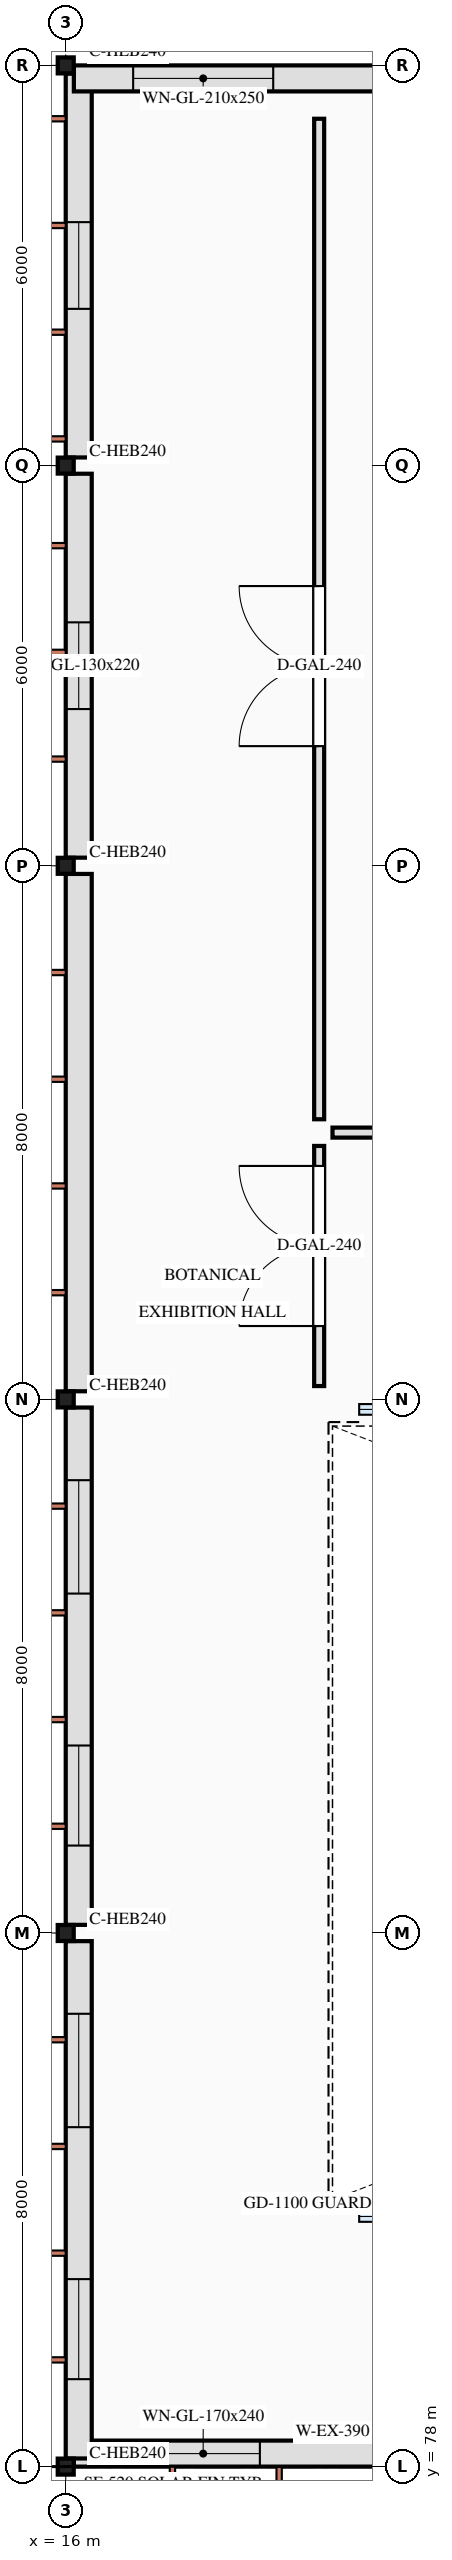
"""IFC4 building model, lengths in metres.
Left out: names, types, materials, properties, quantities, classifications, styles, units other than length and angle.
Written with IfcOpenShell. Run it as: python <this file> out.ifc"""

import sys

from ifc_helpers import new_model, si_unit, direction, frame, frame_2d, origin, origin_2d, place, context, subcontext, project, spatial, rectangle, i_section, extrude, element, fill, save


model = new_model("IFC4")
c1 = context("Model", 3, precision=1e-05, world=origin(), true_north=direction((0.0, 1.0)))
c2 = subcontext(c1, "Body", "Model", "MODEL_VIEW")
j1 = project(units=[si_unit("LENGTHUNIT", "METRE"), si_unit("PLANEANGLEUNIT", "RADIAN")], contexts=[c1])
p1 = place(None, origin())
s1 = spatial("IfcSite", under=j1, at=p1, CompositionType="ELEMENT")
p2 = place(p1, origin())
s2 = spatial("IfcBuilding", under=s1, at=p2, CompositionType="ELEMENT")
p3 = place(p2, frame((0.0, 0.0, 17.6)))
s3 = spatial("IfcBuildingStorey", under=s2, at=p3, CompositionType="ELEMENT", Elevation=17.6)
for number, where, z_axis, x_axis in (
    (1, (16.0, 78.0, 0.0), (0.0, 0.0, 1.0), (1.0, 0.0, 0.0)),
    (2, (16.0, 86.0, 0.0), (0.0, 0.0, 1.0), (1.0, 0.0, 0.0)),
    (3, (16.0, 94.0, 0.0), (0.0, 0.0, 1.0), (1.0, 0.0, 0.0)),
    (4, (16.0, 102.0, 0.0), (0.0, 0.0, 1.0), (1.0, 0.0, 0.0)),
    (5, (16.0, 108.0, 0.0), (0.0, 0.0, 1.0), (1.0, 0.0, 0.0)),
    (6, (16.0, 114.0, 0.0), (0.0, 0.0, 1.0), (1.0, 0.0, 0.0)),
):
    element("IfcColumn", number, at=place(p3, frame(where, z_axis=z_axis, x_axis=x_axis)), inside=s3, PredefinedType="COLUMN", context=c2, shape_type="SweptSolid", body=[
        extrude(i_section(OverallWidth=0.24, OverallDepth=0.24, WebThickness=0.01, FlangeThickness=0.017, FilletRadius=0.021, at=origin_2d()), origin(), (0.0, 0.0, 1.0), 4.2),
    ])
p4 = place(p3, frame((23.878, 78.195, 0.0), z_axis=(0.0, 0.0, 1.0), x_axis=(-1.0, 0.0, 0.0)))
e7 = element("IfcWall", 7, at=p4, inside=s3, PredefinedType="SOLIDWALL", context=c2, shape_type="SweptSolid", body=[
    extrude(rectangle(XDim=7.756, YDim=0.39, at=frame_2d((3.878, 0.0))), origin(), (0.0, 0.0, 1.0), 3.505),
])
p5 = place(p4, frame((1.189, 0.0, 0.85)))
e8 = element("IfcOpeningElement", 8, at=p5, cuts=e7, PredefinedType="OPENING", context=c2, shape_type="SweptSolid", body=[
    extrude(rectangle(XDim=1.5, YDim=2.4, at=frame_2d((0.75, 1.2))), frame((0.0, 0.205, 0.0), z_axis=(0.0, -1.0, 0.0), x_axis=(1.0, 0.0, 0.0)), (0.0, 0.0, 1.0), 0.41),
])
p6 = place(p4, frame((4.967, 0.0, 0.85)))
e9 = element("IfcOpeningElement", 9, at=p6, cuts=e7, PredefinedType="OPENING", context=c2, shape_type="SweptSolid", body=[
    extrude(rectangle(XDim=1.7, YDim=2.4, at=frame_2d((0.85, 1.2))), frame((0.0, 0.205, 0.0), z_axis=(0.0, -1.0, 0.0), x_axis=(1.0, 0.0, 0.0)), (0.0, 0.0, 1.0), 0.41),
])
p7 = place(p3, frame((16.195, 78.122, 0.0), z_axis=(0.0, 0.0, 1.0), x_axis=(0.0, 1.0, 0.0)))
e10 = element("IfcWall", 10, at=p7, inside=s3, PredefinedType="SOLIDWALL", context=c2, shape_type="SweptSolid", body=[
    extrude(rectangle(XDim=7.756, YDim=0.39, at=frame_2d((3.878, 0.0))), origin(), (0.0, 0.0, 1.0), 3.505),
])
p8 = place(p7, frame((1.189, 0.0, 0.85)))
e11 = element("IfcOpeningElement", 11, at=p8, cuts=e10, PredefinedType="OPENING", context=c2, shape_type="SweptSolid", body=[
    extrude(rectangle(XDim=1.5, YDim=2.4, at=frame_2d((0.75, 1.2))), frame((0.0, 0.205, 0.0), z_axis=(0.0, -1.0, 0.0), x_axis=(1.0, 0.0, 0.0)), (0.0, 0.0, 1.0), 0.41),
])
p9 = place(p7, frame((4.967, 0.0, 0.85)))
e12 = element("IfcOpeningElement", 12, at=p9, cuts=e10, PredefinedType="OPENING", context=c2, shape_type="SweptSolid", body=[
    extrude(rectangle(XDim=1.7, YDim=2.4, at=frame_2d((0.85, 1.2))), frame((0.0, 0.205, 0.0), z_axis=(0.0, -1.0, 0.0), x_axis=(1.0, 0.0, 0.0)), (0.0, 0.0, 1.0), 0.41),
])
p10 = place(p3, frame((16.195, 86.122, 0.0), z_axis=(0.0, 0.0, 1.0), x_axis=(0.0, 1.0, 0.0)))
e13 = element("IfcWall", 13, at=p10, inside=s3, PredefinedType="SOLIDWALL", context=c2, shape_type="SweptSolid", body=[
    extrude(rectangle(XDim=7.756, YDim=0.39, at=frame_2d((3.878, 0.0))), origin(), (0.0, 0.0, 1.0), 3.505),
])
p11 = place(p10, frame((1.189, 0.0, 0.85)))
e14 = element("IfcOpeningElement", 14, at=p11, cuts=e13, PredefinedType="OPENING", context=c2, shape_type="SweptSolid", body=[
    extrude(rectangle(XDim=1.5, YDim=2.4, at=frame_2d((0.75, 1.2))), frame((0.0, 0.205, 0.0), z_axis=(0.0, -1.0, 0.0), x_axis=(1.0, 0.0, 0.0)), (0.0, 0.0, 1.0), 0.41),
])
p12 = place(p10, frame((4.967, 0.0, 0.85)))
e15 = element("IfcOpeningElement", 15, at=p12, cuts=e13, PredefinedType="OPENING", context=c2, shape_type="SweptSolid", body=[
    extrude(rectangle(XDim=1.7, YDim=2.4, at=frame_2d((0.85, 1.2))), frame((0.0, 0.205, 0.0), z_axis=(0.0, -1.0, 0.0), x_axis=(1.0, 0.0, 0.0)), (0.0, 0.0, 1.0), 0.41),
])
p13 = place(p3, frame((16.195, 94.122, 0.0), z_axis=(0.0, 0.0, 1.0), x_axis=(0.0, 1.0, 0.0)))
e16 = element("IfcWall", 16, at=p13, inside=s3, PredefinedType="SOLIDWALL", context=c2, shape_type="SweptSolid", body=[
    extrude(rectangle(XDim=7.756, YDim=0.39, at=frame_2d((3.878, 0.0))), origin(), (0.0, 0.0, 1.0), 3.505),
])
p14 = place(p3, frame((16.195, 102.122, 0.0), z_axis=(0.0, 0.0, 1.0), x_axis=(0.0, 1.0, 0.0)))
e17 = element("IfcWall", 17, at=p14, inside=s3, PredefinedType="SOLIDWALL", context=c2, shape_type="SweptSolid", body=[
    extrude(rectangle(XDim=5.756, YDim=0.39, at=frame_2d((2.878, 0.0))), origin(), (0.0, 0.0, 1.0), 3.505),
])
p15 = place(p14, frame((2.228, 0.0, 0.85)))
e18 = element("IfcOpeningElement", 18, at=p15, cuts=e17, PredefinedType="OPENING", context=c2, shape_type="SweptSolid", body=[
    extrude(rectangle(XDim=1.3, YDim=2.2, at=frame_2d((0.65, 1.1))), frame((0.0, 0.205, 0.0), z_axis=(0.0, -1.0, 0.0), x_axis=(1.0, 0.0, 0.0)), (0.0, 0.0, 1.0), 0.41),
])
p16 = place(p3, frame((16.195, 108.122, 0.0), z_axis=(0.0, 0.0, 1.0), x_axis=(0.0, 1.0, 0.0)))
e19 = element("IfcWall", 19, at=p16, inside=s3, PredefinedType="SOLIDWALL", context=c2, shape_type="SweptSolid", body=[
    extrude(rectangle(XDim=5.756, YDim=0.39, at=frame_2d((2.878, 0.0))), origin(), (0.0, 0.0, 1.0), 3.505),
])
p17 = place(p16, frame((2.228, 0.0, 0.85)))
e20 = element("IfcOpeningElement", 20, at=p17, cuts=e19, PredefinedType="OPENING", context=c2, shape_type="SweptSolid", body=[
    extrude(rectangle(XDim=1.3, YDim=2.2, at=frame_2d((0.65, 1.1))), frame((0.0, 0.205, 0.0), z_axis=(0.0, -1.0, 0.0), x_axis=(1.0, 0.0, 0.0)), (0.0, 0.0, 1.0), 0.41),
])
p18 = place(p3, frame((16.122, 113.805, 0.0), z_axis=(0.0, 0.0, 1.0), x_axis=(1.0, 0.0, 0.0)))
e21 = element("IfcWall", 21, at=p18, inside=s3, PredefinedType="SOLIDWALL", context=c2, shape_type="SweptSolid", body=[
    extrude(rectangle(XDim=7.756, YDim=0.39, at=frame_2d((3.878, 0.0))), origin(), (0.0, 0.0, 1.0), 3.505),
])
p19 = place(p18, frame((0.889, 0.0, 0.85)))
e22 = element("IfcOpeningElement", 22, at=p19, cuts=e21, PredefinedType="OPENING", context=c2, shape_type="SweptSolid", body=[
    extrude(rectangle(XDim=2.1, YDim=2.5, at=frame_2d((1.05, 1.25))), frame((0.0, 0.205, 0.0), z_axis=(0.0, -1.0, 0.0), x_axis=(1.0, 0.0, 0.0)), (0.0, 0.0, 1.0), 0.41),
])
p20 = place(p18, frame((4.617, 0.0, 0.765)))
e23 = element("IfcOpeningElement", 23, at=p20, cuts=e21, PredefinedType="OPENING", context=c2, shape_type="SweptSolid", body=[
    extrude(rectangle(XDim=2.4, YDim=2.6, at=frame_2d((1.2, 1.3))), frame((0.0, 0.205, 0.0), z_axis=(0.0, -1.0, 0.0), x_axis=(1.0, 0.0, 0.0)), (0.0, 0.0, 1.0), 0.41),
])
p21 = place(p3, frame((19.8, 94.2, 0.0), z_axis=(0.0, 0.0, 1.0), x_axis=(0.0, 1.0, 0.0)))
e24 = element("IfcWall", 24, at=p21, inside=s3, PredefinedType="PARTITIONING", context=c2, shape_type="SweptSolid", body=[
    extrude(rectangle(XDim=3.6, YDim=0.15, at=frame_2d((1.8, 0.0))), origin(), (0.0, 0.0, 1.0), 3.96),
])
p22 = place(p21, frame((0.9, 0.0, 0.0)))
e25 = element("IfcOpeningElement", 25, at=p22, cuts=e24, PredefinedType="OPENING", context=c2, shape_type="SweptSolid", body=[
    extrude(rectangle(XDim=2.4, YDim=2.75, at=frame_2d((1.2, 1.375))), frame((0.0, 0.085, 0.0), z_axis=(0.0, -1.0, 0.0), x_axis=(1.0, 0.0, 0.0)), (0.0, 0.0, 1.0), 0.17),
])
p23 = place(p3, frame((20.0, 98.0, 0.0), z_axis=(0.0, 0.0, 1.0), x_axis=(1.0, 0.0, 0.0)))
e26 = element("IfcWall", 26, at=p23, inside=s3, PredefinedType="PARTITIONING", context=c2, shape_type="SweptSolid", body=[
    extrude(rectangle(XDim=20.8, YDim=0.15, at=frame_2d((10.4, 0.0))), origin(), (0.0, 0.0, 1.0), 3.96),
])
p24 = place(p23, frame((7.043, 0.0, 0.0)))
e27 = element("IfcOpeningElement", 27, at=p24, cuts=e26, PredefinedType="OPENING", context=c2, shape_type="SweptSolid", body=[
    extrude(rectangle(XDim=2.1, YDim=2.6, at=frame_2d((1.05, 1.3))), frame((0.0, 0.085, 0.0), z_axis=(0.0, -1.0, 0.0), x_axis=(1.0, 0.0, 0.0)), (0.0, 0.0, 1.0), 0.17),
])
p25 = place(p3, frame((19.8, 98.2, 0.0), z_axis=(0.0, 0.0, 1.0), x_axis=(0.0, 1.0, 0.0)))
e28 = element("IfcWall", 28, at=p25, inside=s3, PredefinedType="PARTITIONING", context=c2, shape_type="SweptSolid", body=[
    extrude(rectangle(XDim=15.0, YDim=0.15, at=frame_2d((7.5, 0.0))), origin(), (0.0, 0.0, 1.0), 3.96),
])
p26 = place(p25, frame((5.594, 0.0, 0.0)))
e29 = element("IfcOpeningElement", 29, at=p26, cuts=e28, PredefinedType="OPENING", context=c2, shape_type="SweptSolid", body=[
    extrude(rectangle(XDim=2.4, YDim=2.75, at=frame_2d((1.2, 1.375))), frame((0.0, 0.085, 0.0), z_axis=(0.0, -1.0, 0.0), x_axis=(1.0, 0.0, 0.0)), (0.0, 0.0, 1.0), 0.17),
])
p27 = place(p6, origin())
e30 = element("IfcWindow", 30, at=p27, inside=s3, PartitioningType="DOUBLE_PANEL_VERTICAL", PredefinedType="WINDOW", context=c2, shape_type="SweptSolid", body=[
    extrude(rectangle(XDim=1.7, YDim=2.4, at=frame_2d((0.85, 1.2))), frame((0.0, 0.03, 0.0), z_axis=(0.0, -1.0, 0.0), x_axis=(1.0, 0.0, 0.0)), (0.0, 0.0, 1.0), 0.06),
])
fill(e9, e30)
p28 = place(p8, origin())
e31 = element("IfcWindow", 31, at=p28, inside=s3, PartitioningType="SINGLE_PANEL", PredefinedType="WINDOW", context=c2, shape_type="SweptSolid", body=[
    extrude(rectangle(XDim=1.5, YDim=2.4, at=frame_2d((0.75, 1.2))), frame((0.0, 0.03, 0.0), z_axis=(0.0, -1.0, 0.0), x_axis=(1.0, 0.0, 0.0)), (0.0, 0.0, 1.0), 0.06),
])
fill(e11, e31)
p29 = place(p9, origin())
e32 = element("IfcWindow", 32, at=p29, inside=s3, PartitioningType="DOUBLE_PANEL_VERTICAL", PredefinedType="WINDOW", context=c2, shape_type="SweptSolid", body=[
    extrude(rectangle(XDim=1.7, YDim=2.4, at=frame_2d((0.85, 1.2))), frame((0.0, 0.03, 0.0), z_axis=(0.0, -1.0, 0.0), x_axis=(1.0, 0.0, 0.0)), (0.0, 0.0, 1.0), 0.06),
])
fill(e12, e32)
p30 = place(p11, origin())
e33 = element("IfcWindow", 33, at=p30, inside=s3, PartitioningType="SINGLE_PANEL", PredefinedType="WINDOW", context=c2, shape_type="SweptSolid", body=[
    extrude(rectangle(XDim=1.5, YDim=2.4, at=frame_2d((0.75, 1.2))), frame((0.0, 0.03, 0.0), z_axis=(0.0, -1.0, 0.0), x_axis=(1.0, 0.0, 0.0)), (0.0, 0.0, 1.0), 0.06),
])
fill(e14, e33)
p31 = place(p12, origin())
e34 = element("IfcWindow", 34, at=p31, inside=s3, PartitioningType="DOUBLE_PANEL_VERTICAL", PredefinedType="WINDOW", context=c2, shape_type="SweptSolid", body=[
    extrude(rectangle(XDim=1.7, YDim=2.4, at=frame_2d((0.85, 1.2))), frame((0.0, 0.03, 0.0), z_axis=(0.0, -1.0, 0.0), x_axis=(1.0, 0.0, 0.0)), (0.0, 0.0, 1.0), 0.06),
])
fill(e15, e34)
p32 = place(p15, origin())
e35 = element("IfcWindow", 35, at=p32, inside=s3, PartitioningType="SINGLE_PANEL", PredefinedType="WINDOW", context=c2, shape_type="SweptSolid", body=[
    extrude(rectangle(XDim=1.3, YDim=2.2, at=frame_2d((0.65, 1.1))), frame((0.0, 0.03, 0.0), z_axis=(0.0, -1.0, 0.0), x_axis=(1.0, 0.0, 0.0)), (0.0, 0.0, 1.0), 0.06),
])
fill(e18, e35)
p33 = place(p17, origin())
e36 = element("IfcWindow", 36, at=p33, inside=s3, PartitioningType="SINGLE_PANEL", PredefinedType="WINDOW", context=c2, shape_type="SweptSolid", body=[
    extrude(rectangle(XDim=1.3, YDim=2.2, at=frame_2d((0.65, 1.1))), frame((0.0, 0.03, 0.0), z_axis=(0.0, -1.0, 0.0), x_axis=(1.0, 0.0, 0.0)), (0.0, 0.0, 1.0), 0.06),
])
fill(e20, e36)
p34 = place(p19, origin())
e37 = element("IfcWindow", 37, at=p34, inside=s3, PartitioningType="DOUBLE_PANEL_VERTICAL", PredefinedType="WINDOW", context=c2, shape_type="SweptSolid", body=[
    extrude(rectangle(XDim=2.1, YDim=2.5, at=frame_2d((1.05, 1.25))), frame((0.0, 0.03, 0.0), z_axis=(0.0, -1.0, 0.0), x_axis=(1.0, 0.0, 0.0)), (0.0, 0.0, 1.0), 0.06),
])
fill(e22, e37)
p35 = place(p22, origin())
e38 = element("IfcDoor", 38, at=p35, inside=s3, OperationType="DOUBLE_DOOR_DOUBLE_SWING", PredefinedType="DOOR", context=c2, shape_type="SweptSolid", body=[
    extrude(rectangle(XDim=2.4, YDim=2.75, at=frame_2d((1.2, 1.375))), frame((0.0, 0.025, 0.0), z_axis=(0.0, -1.0, 0.0), x_axis=(1.0, 0.0, 0.0)), (0.0, 0.0, 1.0), 0.05),
])
fill(e25, e38)
p36 = place(p26, origin())
e39 = element("IfcDoor", 39, at=p36, inside=s3, OperationType="DOUBLE_DOOR_DOUBLE_SWING", PredefinedType="DOOR", context=c2, shape_type="SweptSolid", body=[
    extrude(rectangle(XDim=2.4, YDim=2.75, at=frame_2d((1.2, 1.375))), frame((0.0, 0.025, 0.0), z_axis=(0.0, -1.0, 0.0), x_axis=(1.0, 0.0, 0.0)), (0.0, 0.0, 1.0), 0.05),
])
fill(e29, e39)
save(model, sys.argv[1])
